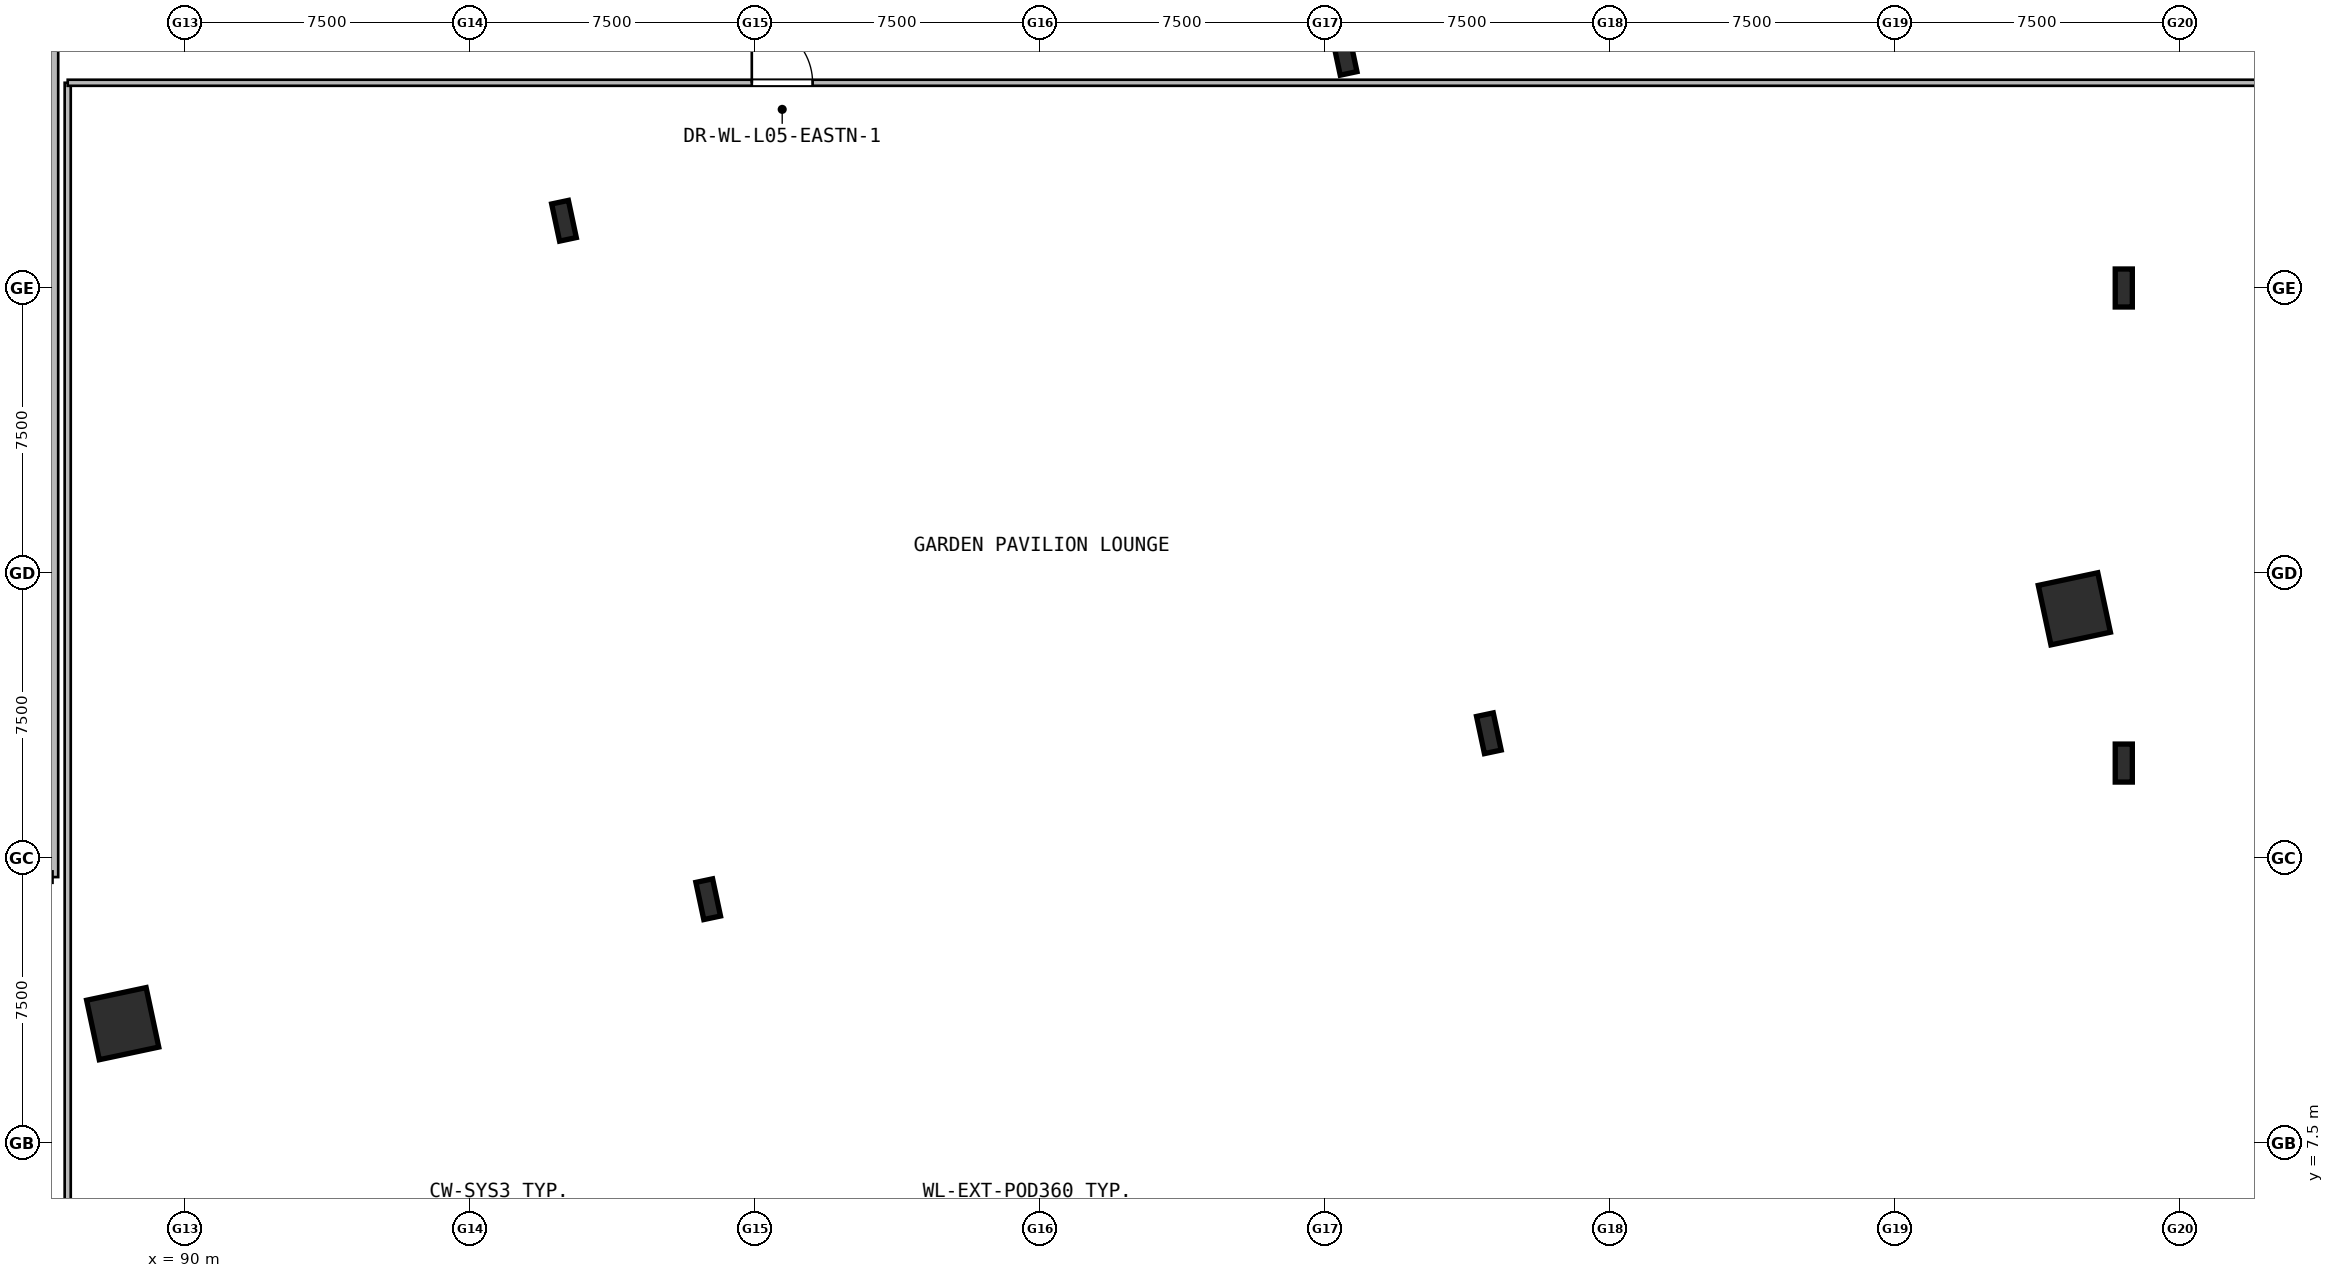
"""IFC4 building model, lengths in metres.
Left out: names, types, materials, properties, quantities, classifications, styles, units other than length and angle.
Written with IfcOpenShell. Run it as: python <this file> out.ifc"""

import sys

from ifc_helpers import new_model, si_unit, direction, frame, frame_2d, origin, origin_2d, place, context, subcontext, project, spatial, rectangle, hollow_rectangle, i_section, extrude, element, fill, save


model = new_model("IFC4")
c1 = context("Model", 3, precision=1e-05, world=origin(), true_north=direction((0.0, 1.0)))
c2 = subcontext(c1, "Body", "Model", "MODEL_VIEW")
j1 = project(units=[si_unit("LENGTHUNIT", "METRE"), si_unit("PLANEANGLEUNIT", "RADIAN")], contexts=[c1])
p1 = place(None, origin())
s1 = spatial("IfcSite", under=j1, at=p1, CompositionType="ELEMENT")
p2 = place(p1, origin())
s2 = spatial("IfcBuilding", under=s1, at=p2, CompositionType="ELEMENT")
p3 = place(p2, frame((0.0, 0.0, 25.2)))
s3 = spatial("IfcBuildingStorey", under=s2, at=p3, CompositionType="ELEMENT", Elevation=25.2)
p4 = place(p3, frame((88.347, 10.643, 0.0), z_axis=(0.0, 0.0, 1.0), x_axis=(0.978147600734, 0.207911690818, 0.0)))
e1 = element("IfcColumn", 1, at=p4, inside=s3, PredefinedType="COLUMN", context=c2, shape_type="SweptSolid", body=[
    extrude(hollow_rectangle(XDim=1.6, YDim=1.6, WallThickness=0.04, at=origin_2d()), origin(), (0.0, 0.0, 1.0), 5.15),
])
for number, where, z_axis, x_axis in (
    (2, (103.753, 13.918, 0.0), (0.0, 0.0, 1.0), (0.978, 0.208, 0.0)),
    (3, (99.958, 31.769, 0.0), (0.0, 0.0, 1.0), (0.978, 0.208, 0.0)),
    (4, (124.294, 18.284, 0.0), (0.0, 0.0, 1.0), (0.978, 0.208, 0.0)),
    (5, (120.499, 36.135, 0.0), (0.0, 0.0, 1.0), (0.978, 0.208, 0.0)),
):
    element("IfcColumn", number, at=place(p3, frame(where, z_axis=z_axis, x_axis=x_axis)), inside=s3, PredefinedType="COLUMN", context=c2, shape_type="SweptSolid", body=[
        extrude(i_section(OverallWidth=0.45, OverallDepth=1.0, WebThickness=0.022, FlangeThickness=0.04, at=origin_2d()), origin(), (0.0, 0.0, 1.0), 5.4),
    ])
p5 = place(p3, frame((139.699, 21.559, 0.0), z_axis=(0.0, 0.0, 1.0), x_axis=(0.978147600734, 0.207911690818, 0.0)))
e6 = element("IfcColumn", 6, at=p5, inside=s3, PredefinedType="COLUMN", context=c2, shape_type="SweptSolid", body=[
    extrude(hollow_rectangle(XDim=1.6, YDim=1.6, WallThickness=0.04, at=origin_2d()), origin(), (0.0, 0.0, 1.0), 5.15),
])
for number, where, z_axis, x_axis in (
    (7, (141.0, 17.5, 0.0), (0.0, 0.0, 1.0), (1.0, 0.0, 0.0)),
    (8, (141.0, 30.0, 0.0), (0.0, 0.0, 1.0), (1.0, 0.0, 0.0)),
):
    element("IfcColumn", number, at=place(p3, frame(where, z_axis=z_axis, x_axis=x_axis)), inside=s3, PredefinedType="COLUMN", context=c2, shape_type="SweptSolid", body=[
        extrude(i_section(OverallWidth=0.45, OverallDepth=1.0, WebThickness=0.022, FlangeThickness=0.04, at=origin_2d()), origin(), (0.0, 0.0, 1.0), 5.4),
    ])
p6 = place(p3, frame((86.5, 44.0, 0.0), z_axis=(0.0, 0.0, 1.0), x_axis=(0.0, -1.0, 0.0)))
e9 = element("IfcWall", 9, at=p6, inside=s3, PredefinedType="SOLIDWALL", context=c2, shape_type="SweptSolid", body=[
    extrude(rectangle(XDim=29.5, YDim=0.3, at=frame_2d((14.75, 0.0))), origin(), (0.0, 0.0, 1.0), 2.63),
])
p7 = place(p3, frame((86.9, 5.65, 0.0), z_axis=(0.0, 0.0, 1.0), x_axis=(0.0, 1.0, 0.0)))
e10 = element("IfcWall", 10, at=p7, inside=s3, PredefinedType="PARTITIONING", context=c2, shape_type="SweptSolid", body=[
    extrude(rectangle(XDim=29.75, YDim=0.16, at=frame_2d((14.875, 0.0))), origin(), (0.0, 0.0, 1.0), 2.63),
])
p8 = place(p3, frame((86.9, 35.4, 0.0), z_axis=(0.0, 0.0, 1.0), x_axis=(1.0, 0.0, 0.0)))
e11 = element("IfcWall", 11, at=p8, inside=s3, PredefinedType="PARTITIONING", context=c2, shape_type="SweptSolid", body=[
    extrude(rectangle(XDim=57.95, YDim=0.16, at=frame_2d((28.975, 0.0))), origin(), (0.0, 0.0, 1.0), 2.63),
])
p9 = place(p8, frame((18.0, 0.0, 0.0)))
e12 = element("IfcOpeningElement", 12, at=p9, cuts=e11, PredefinedType="OPENING", context=c2, shape_type="SweptSolid", body=[
    extrude(rectangle(XDim=1.6, YDim=2.2, at=frame_2d((0.8, 1.1))), frame((0.0, 0.09, 0.0), z_axis=(0.0, -1.0, 0.0), x_axis=(1.0, 0.0, 0.0)), (0.0, 0.0, 1.0), 0.18),
])
p10 = place(p9, origin())
e13 = element("IfcDoor", 13, at=p10, inside=s3, OperationType="DOUBLE_DOOR_SINGLE_SWING", PredefinedType="DOOR", context=c2, shape_type="SweptSolid", body=[
    extrude(rectangle(XDim=1.6, YDim=2.2, at=frame_2d((0.8, 1.1))), frame((0.0, 0.025, 0.0), z_axis=(0.0, -1.0, 0.0), x_axis=(1.0, 0.0, 0.0)), (0.0, 0.0, 1.0), 0.05),
])
fill(e12, e13)
save(model, sys.argv[1])
